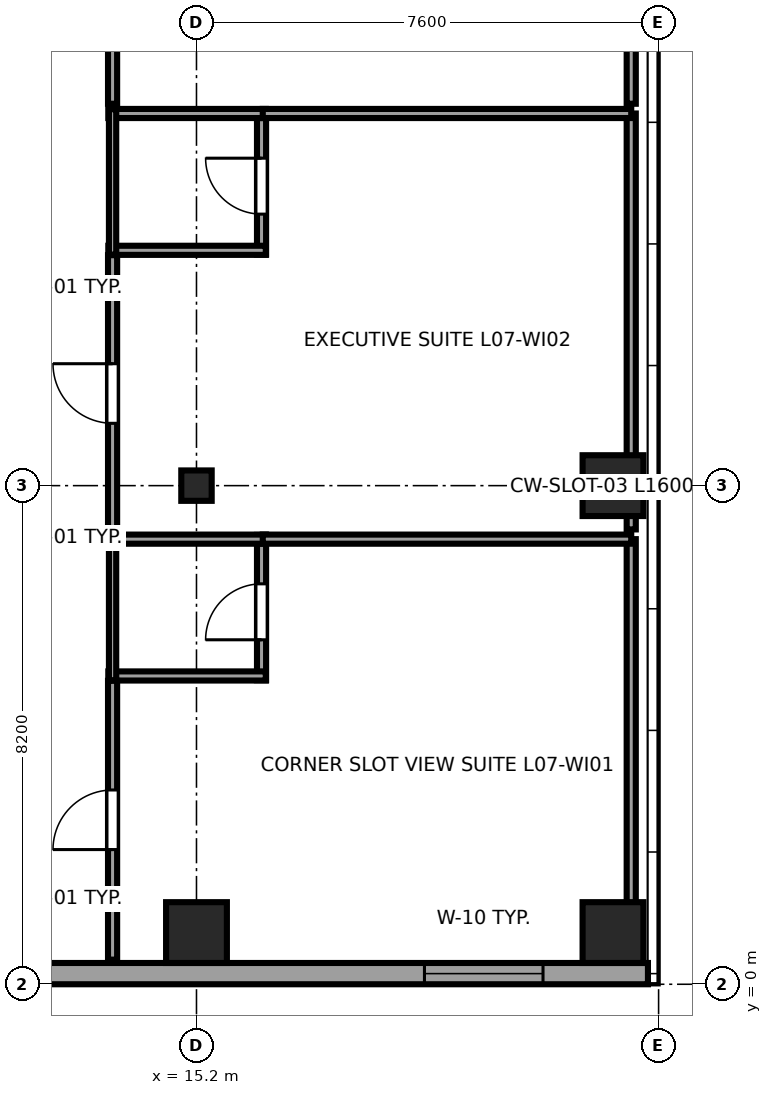
"""IFC4 building model, lengths in metres.
Left out: names, types, materials, properties, quantities, classifications, styles, units other than length and angle.
Written with IfcOpenShell. Run it as: python <this file> out.ifc"""

import sys

from ifc_helpers import new_model, si_unit, direction, frame, frame_2d, origin, origin_2d, place, context, subcontext, project, spatial, rectangle, i_section, extrude, source, transform, mapped, element, fill, save


model = new_model("IFC4")
c1 = context("Model", 3, precision=1e-05, world=origin(), true_north=direction((0.0, 1.0)))
c2 = subcontext(c1, "Body", "Model", "MODEL_VIEW")
j1 = project(units=[si_unit("LENGTHUNIT", "METRE"), si_unit("PLANEANGLEUNIT", "RADIAN")], contexts=[c1])
p1 = place(None, origin())
s1 = spatial("IfcSite", under=j1, at=p1, CompositionType="ELEMENT")
p2 = place(p1, origin())
s2 = spatial("IfcBuilding", under=s1, at=p2, CompositionType="ELEMENT")
p3 = place(p2, frame((0.0, 0.0, 35.55)))
s3 = spatial("IfcBuildingStorey", under=s2, at=p3, CompositionType="ELEMENT", Elevation=35.55)
m1 = source(origin(), c2, "Body", "SweptSolid", [
    extrude(rectangle(XDim=1.0, YDim=1.0, at=origin_2d()), origin(), (0.0, 0.0, 1.0), 3.55),
])
p4 = place(p3, frame((15.2, 0.85, 0.0), z_axis=(0.0, 0.0, 1.0), x_axis=(1.0, 0.0, 0.0)))
e1 = element("IfcColumn", 1, at=p4, inside=s3, PredefinedType="COLUMN", context=c2, shape_type="MappedRepresentation", body=[
    mapped(m1, transform((0.0, 0.0, 0.0), x_axis=(1.0, 0.0, 0.0), y_axis=(0.0, 1.0, 0.0), z_axis=(0.0, 0.0, 1.0), scale=1.0)),
])
m2 = source(origin(), c2, "Body", "SweptSolid", [
    extrude(i_section(OverallWidth=0.5, OverallDepth=0.5, WebThickness=0.028, FlangeThickness=0.045, at=origin_2d()), origin(), (0.0, 0.0, 1.0), 3.55),
])
p5 = place(p3, frame((15.2, 8.2, 0.0), z_axis=(0.0, 0.0, 1.0), x_axis=(1.0, 0.0, 0.0)))
e2 = element("IfcColumn", 2, at=p5, inside=s3, PredefinedType="COLUMN", context=c2, shape_type="MappedRepresentation", body=[
    mapped(m2, transform((0.0, 0.0, 0.0), x_axis=(1.0, 0.0, 0.0), y_axis=(0.0, 1.0, 0.0), z_axis=(0.0, 0.0, 1.0), scale=1.0)),
])
for number, where, z_axis, x_axis in (
    (3, (22.05, 0.85, 0.0), (0.0, 0.0, 1.0), (1.0, 0.0, 0.0)),
    (4, (22.05, 8.2, 0.0), (0.0, 0.0, 1.0), (1.0, 0.0, 0.0)),
):
    element("IfcColumn", number, at=place(p3, frame(where, z_axis=z_axis, x_axis=x_axis)), inside=s3, PredefinedType="COLUMN", context=c2, shape_type="MappedRepresentation", body=[
        mapped(m1, transform((0.0, 0.0, 0.0), x_axis=(1.0, 0.0, 0.0), y_axis=(0.0, 1.0, 0.0), z_axis=(0.0, 0.0, 1.0), scale=1.0)),
    ])
p6 = place(p3, frame((4.617, 0.175, 0.0), z_axis=(0.0, 0.0, 1.0), x_axis=(1.0, 0.0, 0.0)))
e5 = element("IfcWall", 5, at=p6, inside=s3, PredefinedType="SOLIDWALL", context=c2, shape_type="SweptSolid", body=[
    extrude(rectangle(XDim=18.008, YDim=0.35, at=frame_2d((9.004, 0.0))), origin(), (0.0, 0.0, 1.0), 3.37),
])
p7 = place(p6, frame((4.878, 0.0, 0.68)))
e6 = element("IfcOpeningElement", 6, at=p7, cuts=e5, PredefinedType="OPENING", context=c2, shape_type="SweptSolid", body=[
    extrude(rectangle(XDim=1.95, YDim=1.82, at=frame_2d((0.975, 0.91))), frame((0.0, 0.185, 0.0), z_axis=(0.0, -1.0, 0.0), x_axis=(1.0, 0.0, 0.0)), (0.0, 0.0, 1.0), 0.37),
])
p8 = place(p6, frame((14.332, 0.0, 0.68)))
e7 = element("IfcOpeningElement", 7, at=p8, cuts=e5, PredefinedType="OPENING", context=c2, shape_type="SweptSolid", body=[
    extrude(rectangle(XDim=1.95, YDim=1.82, at=frame_2d((0.975, 0.91))), frame((0.0, 0.185, 0.0), z_axis=(0.0, -1.0, 0.0), x_axis=(1.0, 0.0, 0.0)), (0.0, 0.0, 1.0), 0.37),
])
p9 = place(p3, frame((16.27, 5.0, 0.0), z_axis=(0.0, 0.0, 1.0), x_axis=(0.0, 1.0, 0.0)))
e8 = element("IfcWall", 8, at=p9, inside=s3, PredefinedType="PARTITIONING", context=c2, shape_type="SweptSolid", body=[
    extrude(rectangle(XDim=2.39, YDim=0.15, at=frame_2d((1.195, 0.0))), origin(), (0.0, 0.0, 1.0), 3.37),
])
p10 = place(p9, frame((0.665, 0.0, 0.0)))
e9 = element("IfcOpeningElement", 9, at=p10, cuts=e8, PredefinedType="OPENING", context=c2, shape_type="SweptSolid", body=[
    extrude(rectangle(XDim=0.92, YDim=2.01, at=frame_2d((0.46, 1.005))), frame((0.0, 0.085, 0.0), z_axis=(0.0, -1.0, 0.0), x_axis=(1.0, 0.0, 0.0)), (0.0, 0.0, 1.0), 0.17),
])
for number, where, z_axis, x_axis in (
    (10, (13.75, 5.07, 0.0), (0.0, 0.0, 1.0), (1.0, 0.0, 0.0)),
    (11, (13.75, 7.32, 0.0), (0.0, 0.0, 1.0), (1.0, 0.0, 0.0)),
):
    element("IfcWall", number, at=place(p3, frame(where, z_axis=z_axis, x_axis=x_axis)), inside=s3, PredefinedType="PARTITIONING", context=c2, shape_type="SweptSolid", body=[
        extrude(rectangle(XDim=2.59, YDim=0.15, at=frame_2d((1.295, 0.0))), origin(), (0.0, 0.0, 1.0), 3.37),
    ])
p11 = place(p3, frame((13.82, 5.0, 0.0), z_axis=(0.0, 0.0, 1.0), x_axis=(0.0, 1.0, 0.0)))
e12 = element("IfcWall", 12, at=p11, inside=s3, PredefinedType="PLUMBINGWALL", context=c2, shape_type="SweptSolid", body=[
    extrude(rectangle(XDim=2.39, YDim=0.12, at=frame_2d((1.195, 0.0))), origin(), (0.0, 0.0, 1.0), 3.37),
])
p12 = place(p3, frame((16.27, 12.0, 0.0), z_axis=(0.0, 0.0, 1.0), x_axis=(0.0, 1.0, 0.0)))
e13 = element("IfcWall", 13, at=p12, inside=s3, PredefinedType="PARTITIONING", context=c2, shape_type="SweptSolid", body=[
    extrude(rectangle(XDim=2.39, YDim=0.15, at=frame_2d((1.195, 0.0))), origin(), (0.0, 0.0, 1.0), 3.37),
])
p13 = place(p12, frame((0.665, 0.0, 0.0)))
e14 = element("IfcOpeningElement", 14, at=p13, cuts=e13, PredefinedType="OPENING", context=c2, shape_type="SweptSolid", body=[
    extrude(rectangle(XDim=0.92, YDim=2.01, at=frame_2d((0.46, 1.005))), frame((0.0, 0.085, 0.0), z_axis=(0.0, -1.0, 0.0), x_axis=(1.0, 0.0, 0.0)), (0.0, 0.0, 1.0), 0.17),
])
for number, where, z_axis, x_axis in (
    (15, (13.75, 12.07, 0.0), (0.0, 0.0, 1.0), (1.0, 0.0, 0.0)),
    (16, (13.75, 14.32, 0.0), (0.0, 0.0, 1.0), (1.0, 0.0, 0.0)),
):
    element("IfcWall", number, at=place(p3, frame(where, z_axis=z_axis, x_axis=x_axis)), inside=s3, PredefinedType="PARTITIONING", context=c2, shape_type="SweptSolid", body=[
        extrude(rectangle(XDim=2.59, YDim=0.15, at=frame_2d((1.295, 0.0))), origin(), (0.0, 0.0, 1.0), 3.37),
    ])
p14 = place(p3, frame((13.82, 12.0, 0.0), z_axis=(0.0, 0.0, 1.0), x_axis=(0.0, 1.0, 0.0)))
e17 = element("IfcWall", 17, at=p14, inside=s3, PredefinedType="PLUMBINGWALL", context=c2, shape_type="SweptSolid", body=[
    extrude(rectangle(XDim=2.39, YDim=0.12, at=frame_2d((1.195, 0.0))), origin(), (0.0, 0.0, 1.0), 3.37),
])
p15 = place(p3, frame((13.82, 0.405, 0.0), z_axis=(0.0, 0.0, 1.0), x_axis=(0.0, 1.0, 0.0)))
e18 = element("IfcWall", 18, at=p15, inside=s3, PredefinedType="PARTITIONING", context=c2, shape_type="SweptSolid", body=[
    extrude(rectangle(XDim=4.585, YDim=0.15, at=frame_2d((2.292, 0.0))), origin(), (0.0, 0.0, 1.0), 3.37),
])
p16 = place(p15, frame((1.81, 0.0, 0.0)))
e19 = element("IfcOpeningElement", 19, at=p16, cuts=e18, PredefinedType="OPENING", context=c2, shape_type="SweptSolid", body=[
    extrude(rectangle(XDim=0.98, YDim=2.12, at=frame_2d((0.49, 1.06))), frame((0.0, 0.085, 0.0), z_axis=(0.0, -1.0, 0.0), x_axis=(1.0, 0.0, 0.0)), (0.0, 0.0, 1.0), 0.17),
])
p17 = place(p3, frame((22.35, 0.405, 0.0), z_axis=(0.0, 0.0, 1.0), x_axis=(0.0, 1.0, 0.0)))
e20 = element("IfcWall", 20, at=p17, inside=s3, PredefinedType="PARTITIONING", context=c2, shape_type="SweptSolid", body=[
    extrude(rectangle(XDim=6.915, YDim=0.15, at=frame_2d((3.458, 0.0))), origin(), (0.0, 0.0, 1.0), 3.37),
])
p18 = place(p3, frame((16.29, 7.32, 0.0), z_axis=(0.0, 0.0, 1.0), x_axis=(1.0, 0.0, 0.0)))
e21 = element("IfcWall", 21, at=p18, inside=s3, PredefinedType="PARTITIONING", context=c2, shape_type="SweptSolid", body=[
    extrude(rectangle(XDim=6.06, YDim=0.15, at=frame_2d((3.03, 0.0))), origin(), (0.0, 0.0, 1.0), 3.37),
])
p19 = place(p3, frame((13.82, 7.48, 0.0), z_axis=(0.0, 0.0, 1.0), x_axis=(0.0, 1.0, 0.0)))
e22 = element("IfcWall", 22, at=p19, inside=s3, PredefinedType="PARTITIONING", context=c2, shape_type="SweptSolid", body=[
    extrude(rectangle(XDim=4.51, YDim=0.15, at=frame_2d((2.255, 0.0))), origin(), (0.0, 0.0, 1.0), 3.37),
])
p20 = place(p19, frame((1.745, 0.0, 0.0)))
e23 = element("IfcOpeningElement", 23, at=p20, cuts=e22, PredefinedType="OPENING", context=c2, shape_type="SweptSolid", body=[
    extrude(rectangle(XDim=0.98, YDim=2.12, at=frame_2d((0.49, 1.06))), frame((0.0, 0.085, 0.0), z_axis=(0.0, -1.0, 0.0), x_axis=(1.0, 0.0, 0.0)), (0.0, 0.0, 1.0), 0.17),
])
p21 = place(p3, frame((22.35, 7.48, 0.0), z_axis=(0.0, 0.0, 1.0), x_axis=(0.0, 1.0, 0.0)))
e24 = element("IfcWall", 24, at=p21, inside=s3, PredefinedType="PARTITIONING", context=c2, shape_type="SweptSolid", body=[
    extrude(rectangle(XDim=6.84, YDim=0.15, at=frame_2d((3.42, 0.0))), origin(), (0.0, 0.0, 1.0), 3.37),
])
p22 = place(p3, frame((16.29, 14.32, 0.0), z_axis=(0.0, 0.0, 1.0), x_axis=(1.0, 0.0, 0.0)))
e25 = element("IfcWall", 25, at=p22, inside=s3, PredefinedType="PARTITIONING", context=c2, shape_type="SweptSolid", body=[
    extrude(rectangle(XDim=6.06, YDim=0.15, at=frame_2d((3.03, 0.0))), origin(), (0.0, 0.0, 1.0), 3.37),
])
p23 = place(p3, frame((13.82, 14.48, 0.0), z_axis=(0.0, 0.0, 1.0), x_axis=(0.0, 1.0, 0.0)))
e26 = element("IfcWall", 26, at=p23, inside=s3, PredefinedType="PARTITIONING", context=c2, shape_type="SweptSolid", body=[
    extrude(rectangle(XDim=4.41, YDim=0.15, at=frame_2d((2.205, 0.0))), origin(), (0.0, 0.0, 1.0), 3.37),
])
p24 = place(p23, frame((1.995, 0.0, 0.0)))
e27 = element("IfcOpeningElement", 27, at=p24, cuts=e26, PredefinedType="OPENING", context=c2, shape_type="SweptSolid", body=[
    extrude(rectangle(XDim=0.98, YDim=2.12, at=frame_2d((0.49, 1.06))), frame((0.0, 0.085, 0.0), z_axis=(0.0, -1.0, 0.0), x_axis=(1.0, 0.0, 0.0)), (0.0, 0.0, 1.0), 0.17),
])
p25 = place(p3, frame((22.35, 14.48, 0.0), z_axis=(0.0, 0.0, 1.0), x_axis=(0.0, 1.0, 0.0)))
e28 = element("IfcWall", 28, at=p25, inside=s3, PredefinedType="PARTITIONING", context=c2, shape_type="SweptSolid", body=[
    extrude(rectangle(XDim=6.74, YDim=0.15, at=frame_2d((3.37, 0.0))), origin(), (0.0, 0.0, 1.0), 3.37),
])
m3 = source(origin(), c2, "Body", "SweptSolid", [
    extrude(rectangle(XDim=1.95, YDim=1.82, at=frame_2d((0.975, 0.91))), frame((0.0, 0.09, 0.0), z_axis=(0.0, -1.0, 0.0), x_axis=(1.0, 0.0, 0.0)), (0.0, 0.0, 1.0), 0.06),
])
p26 = place(p8, origin())
e29 = element("IfcWindow", 29, at=p26, inside=s3, PartitioningType="DOUBLE_PANEL_VERTICAL", PredefinedType="WINDOW", context=c2, shape_type="MappedRepresentation", body=[
    mapped(m3, transform((0.0, 0.0, 0.0), x_axis=(1.0, 0.0, 0.0), y_axis=(0.0, 1.0, 0.0), z_axis=(0.0, 0.0, 1.0), scale=1.0)),
])
fill(e7, e29)
m4 = source(origin(), c2, "Body", "SweptSolid", [
    extrude(rectangle(XDim=0.92, YDim=2.01, at=frame_2d((0.46, 1.005))), frame((0.0, 0.025, 0.0), z_axis=(0.0, -1.0, 0.0), x_axis=(1.0, 0.0, 0.0)), (0.0, 0.0, 1.0), 0.05),
])
p27 = place(p10, origin())
e30 = element("IfcDoor", 30, at=p27, inside=s3, OperationType="SINGLE_SWING_LEFT", PredefinedType="DOOR", context=c2, shape_type="MappedRepresentation", body=[
    mapped(m4, transform((0.0, 0.0, 0.0), x_axis=(1.0, 0.0, 0.0), y_axis=(0.0, 1.0, 0.0), z_axis=(0.0, 0.0, 1.0), scale=1.0)),
])
fill(e9, e30)
p28 = place(p13, origin())
e31 = element("IfcDoor", 31, at=p28, inside=s3, OperationType="SINGLE_SWING_RIGHT", PredefinedType="DOOR", context=c2, shape_type="MappedRepresentation", body=[
    mapped(m4, transform((0.0, 0.0, 0.0), x_axis=(1.0, 0.0, 0.0), y_axis=(0.0, 1.0, 0.0), z_axis=(0.0, 0.0, 1.0), scale=1.0)),
])
fill(e14, e31)
m5 = source(origin(), c2, "Body", "SweptSolid", [
    extrude(rectangle(XDim=0.98, YDim=2.12, at=frame_2d((0.49, 1.06))), frame((0.0, 0.025, 0.0), z_axis=(0.0, -1.0, 0.0), x_axis=(1.0, 0.0, 0.0)), (0.0, 0.0, 1.0), 0.05),
])
p29 = place(p16, origin())
e32 = element("IfcDoor", 32, at=p29, inside=s3, OperationType="SINGLE_SWING_LEFT", PredefinedType="DOOR", context=c2, shape_type="MappedRepresentation", body=[
    mapped(m5, transform((0.0, 0.0, 0.0), x_axis=(1.0, 0.0, 0.0), y_axis=(0.0, 1.0, 0.0), z_axis=(0.0, 0.0, 1.0), scale=1.0)),
])
fill(e19, e32)
p30 = place(p20, origin())
e33 = element("IfcDoor", 33, at=p30, inside=s3, OperationType="SINGLE_SWING_RIGHT", PredefinedType="DOOR", context=c2, shape_type="MappedRepresentation", body=[
    mapped(m5, transform((0.0, 0.0, 0.0), x_axis=(1.0, 0.0, 0.0), y_axis=(0.0, 1.0, 0.0), z_axis=(0.0, 0.0, 1.0), scale=1.0)),
])
fill(e23, e33)
save(model, sys.argv[1])
